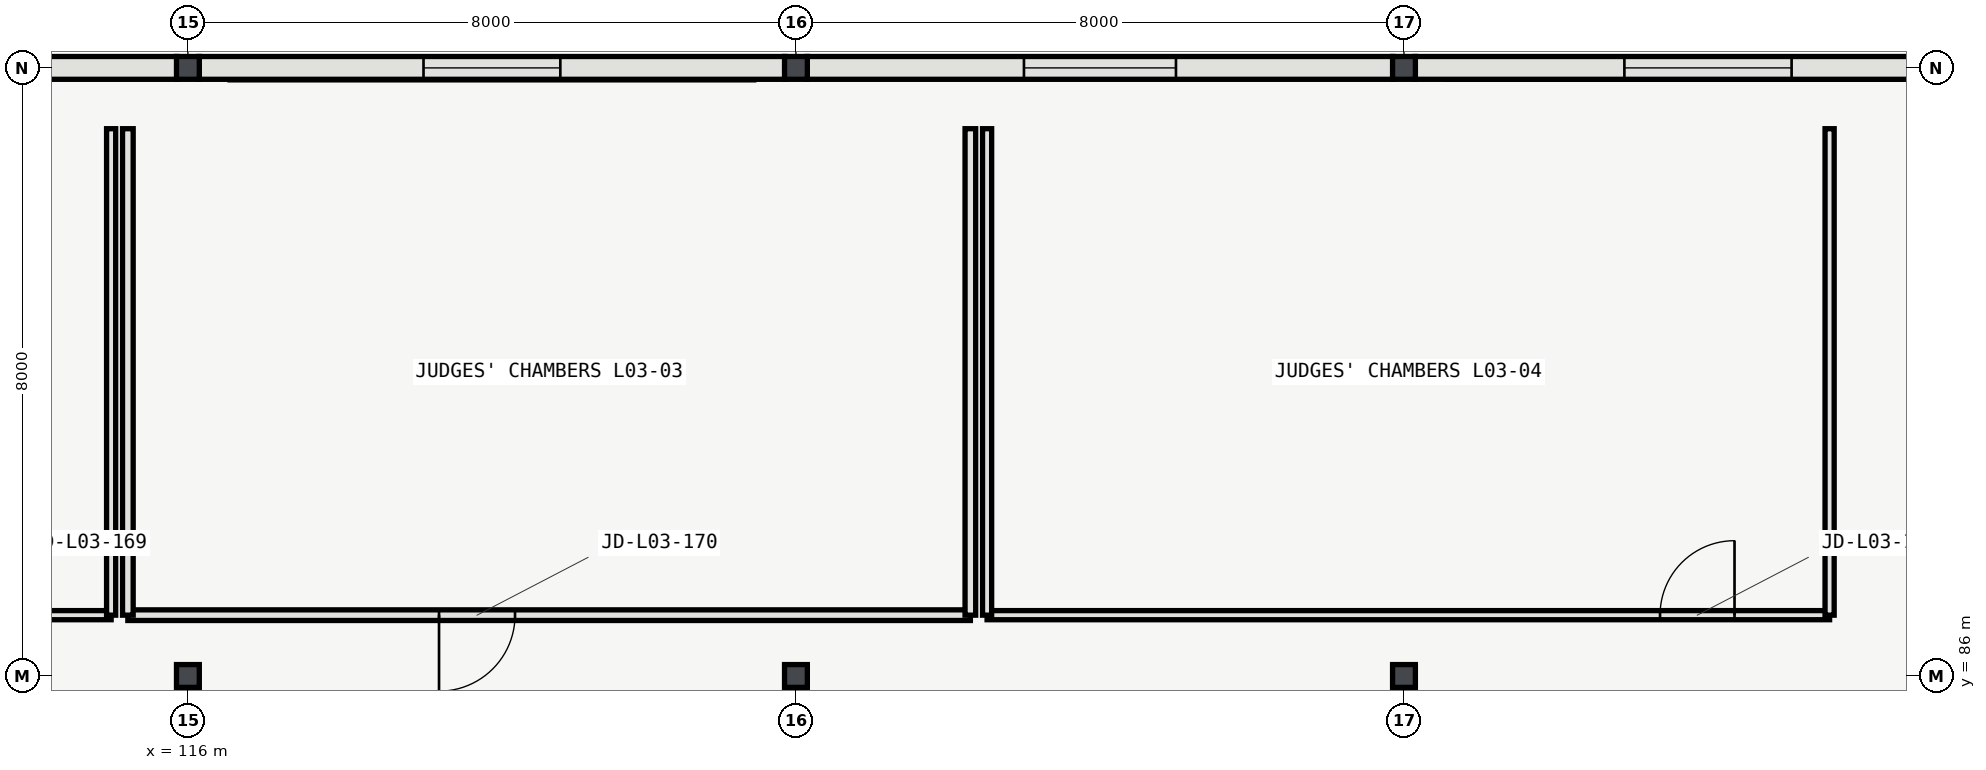
"""IFC4 building model, lengths in metres.
Left out: names, types, materials, properties, quantities, classifications, styles, units other than length and angle.
Written with IfcOpenShell. Run it as: python <this file> out.ifc"""

import sys

from ifc_helpers import new_model, si_unit, direction, frame, frame_2d, origin, origin_2d, place, context, subcontext, project, spatial, rectangle, i_section, extrude, element, fill, save


model = new_model("IFC4")
c1 = context("Model", 3, precision=1e-05, world=origin(), true_north=direction((0.0, 1.0)))
c2 = subcontext(c1, "Body", "Model", "MODEL_VIEW")
j1 = project(units=[si_unit("LENGTHUNIT", "METRE"), si_unit("PLANEANGLEUNIT", "RADIAN")], contexts=[c1])
p1 = place(None, origin())
s1 = spatial("IfcSite", under=j1, at=p1, CompositionType="ELEMENT")
p2 = place(p1, origin())
s2 = spatial("IfcBuilding", under=s1, at=p2, CompositionType="ELEMENT")
p3 = place(p2, frame((0.0, 0.0, 16.2)))
s3 = spatial("IfcBuildingStorey", under=s2, at=p3, CompositionType="ELEMENT", Elevation=16.2)
for number, where, z_axis, x_axis in (
    (1, (116.0, 86.0, 0.0), (0.0, 0.0, 1.0), (1.0, 0.0, 0.0)),
    (2, (116.0, 94.0, 0.0), (0.0, 0.0, 1.0), (1.0, 0.0, 0.0)),
    (3, (124.0, 86.0, 0.0), (0.0, 0.0, 1.0), (1.0, 0.0, 0.0)),
    (4, (124.0, 94.0, 0.0), (0.0, 0.0, 1.0), (1.0, 0.0, 0.0)),
    (5, (132.0, 86.0, 0.0), (0.0, 0.0, 1.0), (1.0, 0.0, 0.0)),
    (6, (132.0, 94.0, 0.0), (0.0, 0.0, 1.0), (1.0, 0.0, 0.0)),
):
    element("IfcColumn", number, at=place(p3, frame(where, z_axis=z_axis, x_axis=x_axis)), inside=s3, PredefinedType="COLUMN", context=c2, shape_type="SweptSolid", body=[
        extrude(i_section(OverallWidth=0.3, OverallDepth=0.3, WebThickness=0.01, FlangeThickness=0.015, FilletRadius=0.018, at=origin_2d()), origin(), (0.0, 0.0, 1.0), 4.2),
    ])
p4 = place(p3, frame((115.854, 94.0, 0.0), z_axis=(0.0, 0.0, 1.0), x_axis=(-1.0, 0.0, 0.0)))
e7 = element("IfcWall", 7, at=p4, inside=s3, PredefinedType="SOLIDWALL", context=c2, shape_type="SweptSolid", body=[
    extrude(rectangle(XDim=7.708, YDim=0.3, at=frame_2d((3.854, 0.0))), origin(), (0.0, 0.0, 1.0), 3.423),
])
p5 = place(p4, frame((3.029, 0.0, 0.95)))
e8 = element("IfcOpeningElement", 8, at=p5, cuts=e7, PredefinedType="OPENING", context=c2, shape_type="SweptSolid", body=[
    extrude(rectangle(XDim=1.65, YDim=1.8, at=frame_2d((0.825, 0.9))), frame((0.0, 0.16, 0.0), z_axis=(0.0, -1.0, 0.0), x_axis=(1.0, 0.0, 0.0)), (0.0, 0.0, 1.0), 0.32),
])
p6 = place(p3, frame((123.854, 94.0, 0.0), z_axis=(0.0, 0.0, 1.0), x_axis=(-1.0, 0.0, 0.0)))
e9 = element("IfcWall", 9, at=p6, inside=s3, PredefinedType="SOLIDWALL", context=c2, shape_type="SweptSolid", body=[
    extrude(rectangle(XDim=7.708, YDim=0.3, at=frame_2d((3.854, 0.0))), origin(), (0.0, 0.0, 1.0), 3.423),
])
p7 = place(p6, frame((2.954, 0.0, 0.95)))
e10 = element("IfcOpeningElement", 10, at=p7, cuts=e9, PredefinedType="OPENING", context=c2, shape_type="SweptSolid", body=[
    extrude(rectangle(XDim=1.8, YDim=1.8, at=frame_2d((0.9, 0.9))), frame((0.0, 0.16, 0.0), z_axis=(0.0, -1.0, 0.0), x_axis=(1.0, 0.0, 0.0)), (0.0, 0.0, 1.0), 0.32),
])
p8 = place(p3, frame((131.854, 94.0, 0.0), z_axis=(0.0, 0.0, 1.0), x_axis=(-1.0, 0.0, 0.0)))
e11 = element("IfcWall", 11, at=p8, inside=s3, PredefinedType="SOLIDWALL", context=c2, shape_type="SweptSolid", body=[
    extrude(rectangle(XDim=7.708, YDim=0.3, at=frame_2d((3.854, 0.0))), origin(), (0.0, 0.0, 1.0), 3.423),
])
p9 = place(p8, frame((2.854, 0.0, 0.95)))
e12 = element("IfcOpeningElement", 12, at=p9, cuts=e11, PredefinedType="OPENING", context=c2, shape_type="SweptSolid", body=[
    extrude(rectangle(XDim=2.0, YDim=1.8, at=frame_2d((1.0, 0.9))), frame((0.0, 0.16, 0.0), z_axis=(0.0, -1.0, 0.0), x_axis=(1.0, 0.0, 0.0)), (0.0, 0.0, 1.0), 0.32),
])
p10 = place(p3, frame((139.854, 94.0, 0.0), z_axis=(0.0, 0.0, 1.0), x_axis=(-1.0, 0.0, 0.0)))
e13 = element("IfcWall", 13, at=p10, inside=s3, PredefinedType="SOLIDWALL", context=c2, shape_type="SweptSolid", body=[
    extrude(rectangle(XDim=7.708, YDim=0.3, at=frame_2d((3.854, 0.0))), origin(), (0.0, 0.0, 1.0), 3.423),
])
p11 = place(p10, frame((2.754, 0.0, 0.95)))
e14 = element("IfcOpeningElement", 14, at=p11, cuts=e13, PredefinedType="OPENING", context=c2, shape_type="SweptSolid", body=[
    extrude(rectangle(XDim=2.2, YDim=1.8, at=frame_2d((1.1, 0.9))), frame((0.0, 0.16, 0.0), z_axis=(0.0, -1.0, 0.0), x_axis=(1.0, 0.0, 0.0)), (0.0, 0.0, 1.0), 0.32),
])
p12 = place(p3, frame((103.905, 86.8, 0.0), z_axis=(0.0, 0.0, 1.0), x_axis=(1.0, 0.0, 0.0)))
e15 = element("IfcWall", 15, at=p12, inside=s3, PredefinedType="PARTITIONING", context=c2, shape_type="SweptSolid", body=[
    extrude(rectangle(XDim=11.085, YDim=0.12, at=frame_2d((5.542, 0.0))), origin(), (0.0, 0.0, 1.0), 3.92),
])
p13 = place(p12, frame((7.904, 0.0, 0.0)))
e16 = element("IfcOpeningElement", 16, at=p13, cuts=e15, PredefinedType="OPENING", context=c2, shape_type="SweptSolid", body=[
    extrude(rectangle(XDim=0.98, YDim=2.2, at=frame_2d((0.49, 1.1))), frame((0.0, 0.07, 0.0), z_axis=(0.0, -1.0, 0.0), x_axis=(1.0, 0.0, 0.0)), (0.0, 0.0, 1.0), 0.14),
])
p14 = place(p3, frame((114.99, 86.8, 0.0), z_axis=(0.0, 0.0, 1.0), x_axis=(0.0, 1.0, 0.0)))
e17 = element("IfcWall", 17, at=p14, inside=s3, PredefinedType="PARTITIONING", context=c2, shape_type="SweptSolid", body=[
    extrude(rectangle(XDim=6.4, YDim=0.12, at=frame_2d((3.2, 0.0))), origin(), (0.0, 0.0, 1.0), 3.92),
])
p15 = place(p3, frame((115.21, 86.8, 0.0), z_axis=(0.0, 0.0, 1.0), x_axis=(1.0, 0.0, 0.0)))
e18 = element("IfcWall", 18, at=p15, inside=s3, PredefinedType="PARTITIONING", context=c2, shape_type="SweptSolid", body=[
    extrude(rectangle(XDim=11.085, YDim=0.14, at=frame_2d((5.542, 0.0))), origin(), (0.0, 0.0, 1.0), 3.92),
])
p16 = place(p15, frame((4.094, 0.0, 0.0)))
e19 = element("IfcOpeningElement", 19, at=p16, cuts=e18, PredefinedType="OPENING", context=c2, shape_type="SweptSolid", body=[
    extrude(rectangle(XDim=1.0, YDim=2.15, at=frame_2d((0.5, 1.075))), frame((0.0, 0.08, 0.0), z_axis=(0.0, -1.0, 0.0), x_axis=(1.0, 0.0, 0.0)), (0.0, 0.0, 1.0), 0.16),
])
for number, where, z_axis, x_axis in (
    (20, (115.21, 93.2, 0.0), (0.0, 0.0, 1.0), (0.0, -1.0, 0.0)),
    (21, (126.295, 86.8, 0.0), (0.0, 0.0, 1.0), (0.0, 1.0, 0.0)),
):
    element("IfcWall", number, at=place(p3, frame(where, z_axis=z_axis, x_axis=x_axis)), inside=s3, PredefinedType="PARTITIONING", context=c2, shape_type="SweptSolid", body=[
        extrude(rectangle(XDim=6.4, YDim=0.14, at=frame_2d((3.2, 0.0))), origin(), (0.0, 0.0, 1.0), 3.92),
    ])
p17 = place(p3, frame((126.515, 86.8, 0.0), z_axis=(0.0, 0.0, 1.0), x_axis=(1.0, 0.0, 0.0)))
e22 = element("IfcWall", 22, at=p17, inside=s3, PredefinedType="PARTITIONING", context=c2, shape_type="SweptSolid", body=[
    extrude(rectangle(XDim=11.085, YDim=0.12, at=frame_2d((5.542, 0.0))), origin(), (0.0, 0.0, 1.0), 3.92),
])
p18 = place(p17, frame((8.854, 0.0, 0.0)))
e23 = element("IfcOpeningElement", 23, at=p18, cuts=e22, PredefinedType="OPENING", context=c2, shape_type="SweptSolid", body=[
    extrude(rectangle(XDim=0.98, YDim=2.15, at=frame_2d((0.49, 1.075))), frame((0.0, 0.07, 0.0), z_axis=(0.0, -1.0, 0.0), x_axis=(1.0, 0.0, 0.0)), (0.0, 0.0, 1.0), 0.14),
])
for number, where, z_axis, x_axis in (
    (24, (126.515, 93.2, 0.0), (0.0, 0.0, 1.0), (0.0, -1.0, 0.0)),
    (25, (137.6, 86.8, 0.0), (0.0, 0.0, 1.0), (0.0, 1.0, 0.0)),
):
    element("IfcWall", number, at=place(p3, frame(where, z_axis=z_axis, x_axis=x_axis)), inside=s3, PredefinedType="PARTITIONING", context=c2, shape_type="SweptSolid", body=[
        extrude(rectangle(XDim=6.4, YDim=0.12, at=frame_2d((3.2, 0.0))), origin(), (0.0, 0.0, 1.0), 3.92),
    ])
p19 = place(p7, origin())
e26 = element("IfcWindow", 26, at=p19, inside=s3, PartitioningType="SINGLE_PANEL", PredefinedType="WINDOW", context=c2, shape_type="SweptSolid", body=[
    extrude(rectangle(XDim=1.8, YDim=1.8, at=frame_2d((0.9, 0.9))), frame((0.0, 0.03, 0.0), z_axis=(0.0, -1.0, 0.0), x_axis=(1.0, 0.0, 0.0)), (0.0, 0.0, 1.0), 0.06),
])
fill(e10, e26)
p20 = place(p9, origin())
e27 = element("IfcWindow", 27, at=p20, inside=s3, PartitioningType="SINGLE_PANEL", PredefinedType="WINDOW", context=c2, shape_type="SweptSolid", body=[
    extrude(rectangle(XDim=2.0, YDim=1.8, at=frame_2d((1.0, 0.9))), frame((0.0, 0.03, 0.0), z_axis=(0.0, -1.0, 0.0), x_axis=(1.0, 0.0, 0.0)), (0.0, 0.0, 1.0), 0.06),
])
fill(e12, e27)
p21 = place(p11, origin())
e28 = element("IfcWindow", 28, at=p21, inside=s3, PartitioningType="SINGLE_PANEL", PredefinedType="WINDOW", context=c2, shape_type="SweptSolid", body=[
    extrude(rectangle(XDim=2.2, YDim=1.8, at=frame_2d((1.1, 0.9))), frame((0.0, 0.03, 0.0), z_axis=(0.0, -1.0, 0.0), x_axis=(1.0, 0.0, 0.0)), (0.0, 0.0, 1.0), 0.06),
])
fill(e14, e28)
p22 = place(p16, origin())
e29 = element("IfcDoor", 29, at=p22, inside=s3, OperationType="SINGLE_SWING_LEFT", PredefinedType="DOOR", context=c2, shape_type="SweptSolid", body=[
    extrude(rectangle(XDim=1.0, YDim=2.15, at=frame_2d((0.5, 1.075))), frame((0.0, 0.025, 0.0), z_axis=(0.0, -1.0, 0.0), x_axis=(1.0, 0.0, 0.0)), (0.0, 0.0, 1.0), 0.05),
])
fill(e19, e29)
p23 = place(p18, origin())
e30 = element("IfcDoor", 30, at=p23, inside=s3, OperationType="SINGLE_SWING_RIGHT", PredefinedType="DOOR", context=c2, shape_type="SweptSolid", body=[
    extrude(rectangle(XDim=0.98, YDim=2.15, at=frame_2d((0.49, 1.075))), frame((0.0, 0.025, 0.0), z_axis=(0.0, -1.0, 0.0), x_axis=(1.0, 0.0, 0.0)), (0.0, 0.0, 1.0), 0.05),
])
fill(e23, e30)
save(model, sys.argv[1])
